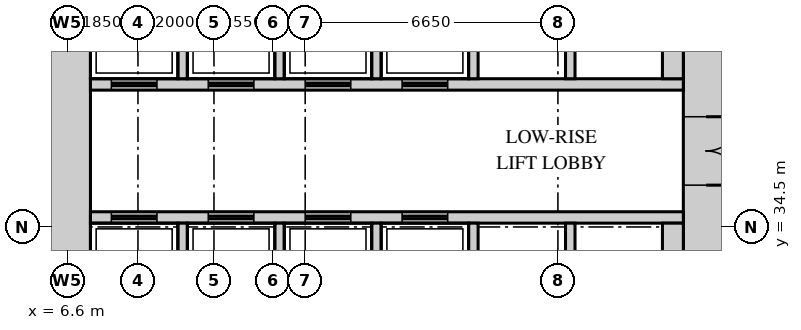
"""IFC4 building model, lengths in metres.
Left out: names, types, materials, properties, quantities, classifications, styles, units other than length and angle.
Written with IfcOpenShell. Run it as: python <this file> out.ifc"""

import sys

from ifc_helpers import new_model, si_unit, direction, frame, frame_2d, origin, place, context, subcontext, project, spatial, rectangle, extrude, source, transform, mapped, element, fill, save


model = new_model("IFC4")
c1 = context("Model", 3, precision=1e-05, world=origin(), true_north=direction((0.0, 1.0)))
c2 = subcontext(c1, "Body", "Model", "MODEL_VIEW")
j1 = project(units=[si_unit("LENGTHUNIT", "METRE"), si_unit("PLANEANGLEUNIT", "RADIAN")], contexts=[c1])
p1 = place(None, origin())
s1 = spatial("IfcSite", under=j1, at=p1, CompositionType="ELEMENT")
p2 = place(p1, origin())
s2 = spatial("IfcBuilding", under=s1, at=p2, CompositionType="ELEMENT")
p3 = place(p2, frame((0.0, 0.0, 18.5)))
s3 = spatial("IfcBuildingStorey", under=s2, at=p3, CompositionType="ELEMENT", Elevation=18.5)
m1 = source(origin(), c2, "Body", "SweptSolid", [
    extrude(rectangle(XDim=27.6, YDim=1.2, at=frame_2d((13.8, 0.0))), origin(), (0.0, 0.0, 1.0), 4.7),
])
p4 = place(p3, frame((23.4, 13.2, 0.0), z_axis=(0.0, 0.0, 1.0), x_axis=(0.0, 1.0, 0.0)))
e1 = element("IfcWall", 1, at=p4, inside=s3, PredefinedType="SHEAR", context=c2, shape_type="MappedRepresentation", body=[
    mapped(m1, transform((0.0, 0.0, 0.0))),
])
m2 = source(origin(), c2, "Body", "SweptSolid", [
    extrude(rectangle(XDim=1.8, YDim=2.1, at=frame_2d((0.9, 1.05))), frame((0.0, 0.61, 0.0), z_axis=(0.0, -1.0, 0.0), x_axis=(1.0, 0.0, 0.0)), (0.0, 0.0, 1.0), 1.22),
])
p5 = place(p4, frame((22.4, 0.0, 0.0)))
e2 = element("IfcOpeningElement", 2, at=p5, cuts=e1, PredefinedType="OPENING", context=c2, shape_type="MappedRepresentation", body=[
    mapped(m2, transform((0.0, 0.0, 0.0))),
])
m3 = source(origin(), c2, "Body", "SweptSolid", [
    extrude(rectangle(XDim=1.2, YDim=2.1, at=frame_2d((0.6, 1.05))), frame((0.0, 0.61, 0.0), z_axis=(0.0, -1.0, 0.0), x_axis=(1.0, 0.0, 0.0)), (0.0, 0.0, 1.0), 1.22),
])
p6 = place(p4, frame((14.4, 0.0, 0.0)))
e3 = element("IfcOpeningElement", 3, at=p6, cuts=e1, PredefinedType="OPENING", context=c2, shape_type="MappedRepresentation", body=[
    mapped(m3, transform((0.0, 0.0, 0.0))),
])
m4 = source(origin(), c2, "Body", "SweptSolid", [
    extrude(rectangle(XDim=0.9, YDim=2.1, at=frame_2d((0.45, 1.05))), frame((0.0, 0.61, 0.0), z_axis=(0.0, -1.0, 0.0), x_axis=(1.0, 0.0, 0.0)), (0.0, 0.0, 1.0), 1.22),
])
p7 = place(p4, frame((1.15, 0.0, 0.0)))
e4 = element("IfcOpeningElement", 4, at=p7, cuts=e1, PredefinedType="OPENING", context=c2, shape_type="MappedRepresentation", body=[
    mapped(m4, transform((0.0, 0.0, 0.0))),
])
p8 = place(p4, frame((6.0, 0.0, 0.0)))
e5 = element("IfcOpeningElement", 5, at=p8, cuts=e1, PredefinedType="OPENING", context=c2, shape_type="MappedRepresentation", body=[
    mapped(m4, transform((0.0, 0.0, 0.0))),
])
p9 = place(p3, frame((6.6, 13.2, 0.0), z_axis=(0.0, 0.0, 1.0), x_axis=(0.0, 1.0, 0.0)))
e6 = element("IfcWall", 6, at=p9, inside=s3, PredefinedType="SHEAR", context=c2, shape_type="MappedRepresentation", body=[
    mapped(m1, transform((0.0, 0.0, 0.0))),
])
m5 = source(origin(), c2, "Body", "SweptSolid", [
    extrude(rectangle(XDim=15.6, YDim=0.3, at=frame_2d((7.8, 0.0))), origin(), (0.0, 0.0, 1.0), 4.7),
])
p10 = place(p3, frame((7.2, 38.25, 0.0), z_axis=(0.0, 0.0, 1.0), x_axis=(1.0, 0.0, 0.0)))
e7 = element("IfcWall", 7, at=p10, inside=s3, PredefinedType="STANDARD", context=c2, shape_type="MappedRepresentation", body=[
    mapped(m5, transform((0.0, 0.0, 0.0))),
])
m6 = source(origin(), c2, "Body", "SweptSolid", [
    extrude(rectangle(XDim=1.2, YDim=2.1, at=frame_2d((0.6, 1.05))), frame((0.0, 0.16, 0.0), z_axis=(0.0, -1.0, 0.0), x_axis=(1.0, 0.0, 0.0)), (0.0, 0.0, 1.0), 0.32),
])
p11 = place(p10, frame((0.55, 0.0, 0.0)))
e8 = element("IfcOpeningElement", 8, at=p11, cuts=e7, PredefinedType="OPENING", context=c2, shape_type="MappedRepresentation", body=[
    mapped(m6, transform((0.0, 0.0, 0.0))),
])
p12 = place(p10, frame((3.1, 0.0, 0.0)))
e9 = element("IfcOpeningElement", 9, at=p12, cuts=e7, PredefinedType="OPENING", context=c2, shape_type="MappedRepresentation", body=[
    mapped(m6, transform((0.0, 0.0, 0.0))),
])
p13 = place(p10, frame((5.65, 0.0, 0.0)))
e10 = element("IfcOpeningElement", 10, at=p13, cuts=e7, PredefinedType="OPENING", context=c2, shape_type="MappedRepresentation", body=[
    mapped(m6, transform((0.0, 0.0, 0.0))),
])
p14 = place(p10, frame((8.2, 0.0, 0.0)))
e11 = element("IfcOpeningElement", 11, at=p14, cuts=e7, PredefinedType="OPENING", context=c2, shape_type="MappedRepresentation", body=[
    mapped(m6, transform((0.0, 0.0, 0.0))),
])
p15 = place(p3, frame((7.2, 34.75, 0.0), z_axis=(0.0, 0.0, 1.0), x_axis=(1.0, 0.0, 0.0)))
e12 = element("IfcWall", 12, at=p15, inside=s3, PredefinedType="STANDARD", context=c2, shape_type="MappedRepresentation", body=[
    mapped(m5, transform((0.0, 0.0, 0.0))),
])
p16 = place(p15, frame((0.55, 0.0, 0.0)))
e13 = element("IfcOpeningElement", 13, at=p16, cuts=e12, PredefinedType="OPENING", context=c2, shape_type="MappedRepresentation", body=[
    mapped(m6, transform((0.0, 0.0, 0.0))),
])
p17 = place(p15, frame((3.1, 0.0, 0.0)))
e14 = element("IfcOpeningElement", 14, at=p17, cuts=e12, PredefinedType="OPENING", context=c2, shape_type="MappedRepresentation", body=[
    mapped(m6, transform((0.0, 0.0, 0.0))),
])
p18 = place(p15, frame((5.65, 0.0, 0.0)))
e15 = element("IfcOpeningElement", 15, at=p18, cuts=e12, PredefinedType="OPENING", context=c2, shape_type="MappedRepresentation", body=[
    mapped(m6, transform((0.0, 0.0, 0.0))),
])
p19 = place(p15, frame((8.2, 0.0, 0.0)))
e16 = element("IfcOpeningElement", 16, at=p19, cuts=e12, PredefinedType="OPENING", context=c2, shape_type="MappedRepresentation", body=[
    mapped(m6, transform((0.0, 0.0, 0.0))),
])
m7 = source(origin(), c2, "Body", "SweptSolid", [
    extrude(rectangle(XDim=2.4, YDim=0.25, at=frame_2d((1.2, 0.0))), origin(), (0.0, 0.0, 1.0), 4.7),
])
for number, where, z_axis, x_axis in (
    (17, (9.625, 38.4, 0.0), (0.0, 0.0, 1.0), (0.0, 1.0, 0.0)),
    (18, (12.175, 38.4, 0.0), (0.0, 0.0, 1.0), (0.0, 1.0, 0.0)),
    (19, (14.725, 38.4, 0.0), (0.0, 0.0, 1.0), (0.0, 1.0, 0.0)),
    (20, (17.275, 38.4, 0.0), (0.0, 0.0, 1.0), (0.0, 1.0, 0.0)),
    (21, (19.825, 38.4, 0.0), (0.0, 0.0, 1.0), (0.0, 1.0, 0.0)),
):
    element("IfcWall", number, at=place(p3, frame(where, z_axis=z_axis, x_axis=x_axis)), inside=s3, PredefinedType="STANDARD", context=c2, shape_type="MappedRepresentation", body=[
        mapped(m7, transform((0.0, 0.0, 0.0))),
    ])
m8 = source(origin(), c2, "Body", "SweptSolid", [
    extrude(rectangle(XDim=2.4, YDim=0.55, at=frame_2d((1.2, 0.0))), origin(), (0.0, 0.0, 1.0), 4.7),
])
p20 = place(p3, frame((22.525, 38.4, 0.0), z_axis=(0.0, 0.0, 1.0), x_axis=(0.0, 1.0, 0.0)))
e22 = element("IfcWall", 22, at=p20, inside=s3, PredefinedType="STANDARD", context=c2, shape_type="MappedRepresentation", body=[
    mapped(m8, transform((0.0, 0.0, 0.0))),
])
for number, where, z_axis, x_axis in (
    (23, (9.625, 32.2, 0.0), (0.0, 0.0, 1.0), (0.0, 1.0, 0.0)),
    (24, (12.175, 32.2, 0.0), (0.0, 0.0, 1.0), (0.0, 1.0, 0.0)),
    (25, (14.725, 32.2, 0.0), (0.0, 0.0, 1.0), (0.0, 1.0, 0.0)),
    (26, (17.275, 32.2, 0.0), (0.0, 0.0, 1.0), (0.0, 1.0, 0.0)),
    (27, (19.825, 32.2, 0.0), (0.0, 0.0, 1.0), (0.0, 1.0, 0.0)),
):
    element("IfcWall", number, at=place(p3, frame(where, z_axis=z_axis, x_axis=x_axis)), inside=s3, PredefinedType="STANDARD", context=c2, shape_type="MappedRepresentation", body=[
        mapped(m7, transform((0.0, 0.0, 0.0))),
    ])
p21 = place(p3, frame((22.525, 32.2, 0.0), z_axis=(0.0, 0.0, 1.0), x_axis=(0.0, 1.0, 0.0)))
e28 = element("IfcWall", 28, at=p21, inside=s3, PredefinedType="STANDARD", context=c2, shape_type="MappedRepresentation", body=[
    mapped(m8, transform((0.0, 0.0, 0.0))),
])
m9 = source(origin(), c2, "Body", "SweptSolid", [
    extrude(rectangle(XDim=1.8, YDim=2.1, at=frame_2d((0.9, 1.05))), frame((0.0, 0.55, 0.0), z_axis=(0.0, -1.0, 0.0), x_axis=(1.0, 0.0, 0.0)), (0.0, 0.0, 1.0), 1.1),
])
p22 = place(p5, origin())
e29 = element("IfcDoor", 29, at=p22, inside=s3, OperationType="DOUBLE_DOOR_SINGLE_SWING", PredefinedType="DOOR", context=c2, shape_type="MappedRepresentation", body=[
    mapped(m9, transform((0.0, 0.0, 0.0))),
])
fill(e2, e29)
m10 = source(origin(), c2, "Body", "SweptSolid", [
    extrude(rectangle(XDim=1.2, YDim=2.1, at=frame_2d((0.6, 1.05))), frame((0.0, 0.025, 0.0), z_axis=(0.0, -1.0, 0.0), x_axis=(1.0, 0.0, 0.0)), (0.0, 0.0, 1.0), 0.05),
])
p23 = place(p16, origin())
e30 = element("IfcDoor", 30, at=p23, inside=s3, OperationType="DOUBLE_DOOR_SLIDING", PredefinedType="DOOR", context=c2, shape_type="MappedRepresentation", body=[
    mapped(m10, transform((0.0, 0.0, 0.0))),
])
fill(e13, e30)
p24 = place(p17, origin())
e31 = element("IfcDoor", 31, at=p24, inside=s3, OperationType="DOUBLE_DOOR_SLIDING", PredefinedType="DOOR", context=c2, shape_type="MappedRepresentation", body=[
    mapped(m10, transform((0.0, 0.0, 0.0))),
])
fill(e14, e31)
p25 = place(p18, origin())
e32 = element("IfcDoor", 32, at=p25, inside=s3, OperationType="DOUBLE_DOOR_SLIDING", PredefinedType="DOOR", context=c2, shape_type="MappedRepresentation", body=[
    mapped(m10, transform((0.0, 0.0, 0.0))),
])
fill(e15, e32)
p26 = place(p19, origin())
e33 = element("IfcDoor", 33, at=p26, inside=s3, OperationType="DOUBLE_DOOR_SLIDING", PredefinedType="DOOR", context=c2, shape_type="MappedRepresentation", body=[
    mapped(m10, transform((0.0, 0.0, 0.0))),
])
fill(e16, e33)
p27 = place(p11, origin())
e34 = element("IfcDoor", 34, at=p27, inside=s3, OperationType="DOUBLE_DOOR_SLIDING", PredefinedType="DOOR", context=c2, shape_type="MappedRepresentation", body=[
    mapped(m10, transform((0.0, 0.0, 0.0))),
])
fill(e8, e34)
p28 = place(p12, origin())
e35 = element("IfcDoor", 35, at=p28, inside=s3, OperationType="DOUBLE_DOOR_SLIDING", PredefinedType="DOOR", context=c2, shape_type="MappedRepresentation", body=[
    mapped(m10, transform((0.0, 0.0, 0.0))),
])
fill(e9, e35)
p29 = place(p13, origin())
e36 = element("IfcDoor", 36, at=p29, inside=s3, OperationType="DOUBLE_DOOR_SLIDING", PredefinedType="DOOR", context=c2, shape_type="MappedRepresentation", body=[
    mapped(m10, transform((0.0, 0.0, 0.0))),
])
fill(e10, e36)
p30 = place(p14, origin())
e37 = element("IfcDoor", 37, at=p30, inside=s3, OperationType="DOUBLE_DOOR_SLIDING", PredefinedType="DOOR", context=c2, shape_type="MappedRepresentation", body=[
    mapped(m10, transform((0.0, 0.0, 0.0))),
])
fill(e11, e37)
save(model, sys.argv[1])
